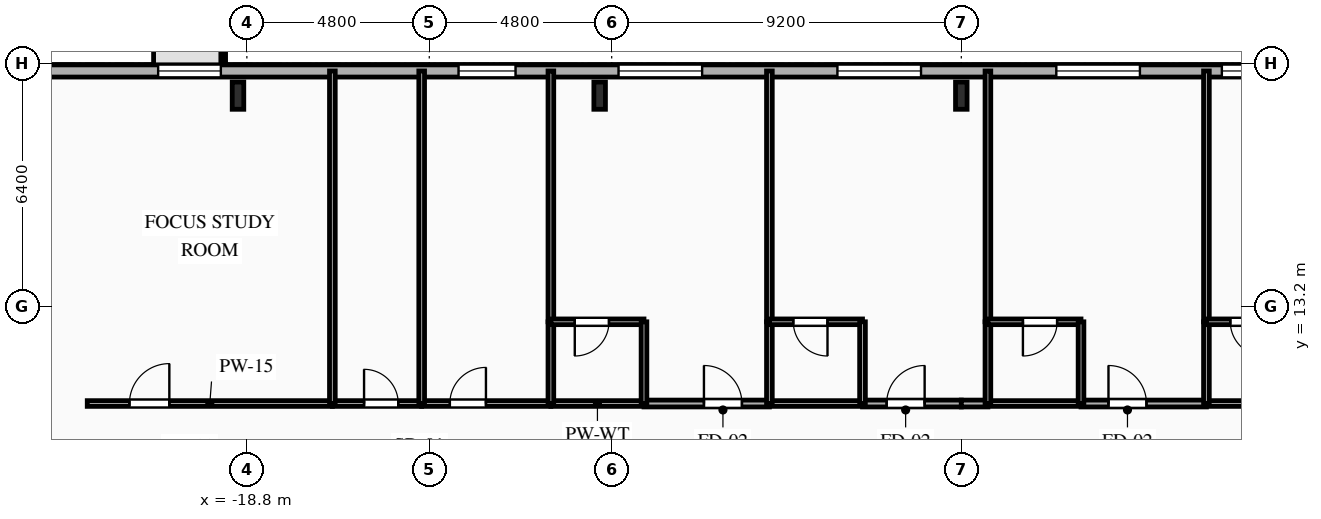
"""IFC4 building model, lengths in metres.
Left out: names, types, materials, properties, quantities, classifications, styles, units other than length and angle.
Written with IfcOpenShell. Run it as: python <this file> out.ifc"""

import sys

from ifc_helpers import new_model, si_unit, direction, frame, frame_2d, origin, origin_2d, place, context, subcontext, project, spatial, rectangle, i_section, extrude, element, fill, save


model = new_model("IFC4")
c1 = context("Model", 3, precision=1e-05, world=origin(), true_north=direction((0.0, 1.0)))
c2 = subcontext(c1, "Body", "Model", "MODEL_VIEW")
j1 = project(units=[si_unit("LENGTHUNIT", "METRE"), si_unit("PLANEANGLEUNIT", "RADIAN")], contexts=[c1])
p1 = place(None, origin())
s1 = spatial("IfcSite", under=j1, at=p1, CompositionType="ELEMENT")
p2 = place(p1, origin())
s2 = spatial("IfcBuilding", under=s1, at=p2, CompositionType="ELEMENT")
p3 = place(p2, frame((0.0, 0.0, 60.5)))
s3 = spatial("IfcBuildingStorey", under=s2, at=p3, CompositionType="ELEMENT", Elevation=60.5)
for number, where, z_axis, x_axis in (
    (1, (0.0, 18.75, 0.0), (0.0, 0.0, 1.0), (1.0, 0.0, 0.0)),
    (2, (-9.517, 18.75, 0.0), (0.0, 0.0, 1.0), (1.0, 0.0, 0.0)),
    (3, (-19.033, 18.75, 0.0), (0.0, 0.0, 1.0), (1.0, 0.0, 0.0)),
):
    element("IfcColumn", number, at=place(p3, frame(where, z_axis=z_axis, x_axis=x_axis)), inside=s3, PredefinedType="COLUMN", context=c2, shape_type="SweptSolid", body=[
        extrude(i_section(OverallWidth=0.304, OverallDepth=0.716, WebThickness=0.021, FlangeThickness=0.04, FilletRadius=0.027, at=origin_2d()), origin(), (0.0, 0.0, 1.0), 3.35),
    ])
p4 = place(p3, frame((-29.2, 19.4, 0.0), z_axis=(0.0, 0.0, 1.0), x_axis=(1.0, 0.0, 0.0)))
e4 = element("IfcWall", 4, at=p4, inside=s3, PredefinedType="SOLIDWALL", context=c2, shape_type="SweptSolid", body=[
    extrude(rectangle(XDim=58.4, YDim=0.32, at=frame_2d((29.2, 0.0))), origin(), (0.0, 0.0, 1.0), 3.035),
])
p5 = place(p4, frame((8.065, 0.0, 0.85)))
e5 = element("IfcOpeningElement", 5, at=p5, cuts=e4, PredefinedType="OPENING", context=c2, shape_type="SweptSolid", body=[
    extrude(rectangle(XDim=1.65, YDim=1.85, at=frame_2d((0.825, 0.925))), frame((0.0, 0.17, 0.0), z_axis=(0.0, -1.0, 0.0), x_axis=(1.0, 0.0, 0.0)), (0.0, 0.0, 1.0), 0.34),
])
p6 = place(p4, frame((15.97, 0.0, 0.85)))
e6 = element("IfcOpeningElement", 6, at=p6, cuts=e4, PredefinedType="OPENING", context=c2, shape_type="SweptSolid", body=[
    extrude(rectangle(XDim=1.5, YDim=1.85, at=frame_2d((0.75, 0.925))), frame((0.0, 0.17, 0.0), z_axis=(0.0, -1.0, 0.0), x_axis=(1.0, 0.0, 0.0)), (0.0, 0.0, 1.0), 0.34),
])
p7 = place(p4, frame((20.18, 0.0, 0.85)))
e7 = element("IfcOpeningElement", 7, at=p7, cuts=e4, PredefinedType="OPENING", context=c2, shape_type="SweptSolid", body=[
    extrude(rectangle(XDim=2.2, YDim=1.85, at=frame_2d((1.1, 0.925))), frame((0.0, 0.17, 0.0), z_axis=(0.0, -1.0, 0.0), x_axis=(1.0, 0.0, 0.0)), (0.0, 0.0, 1.0), 0.34),
])
p8 = place(p4, frame((25.94, 0.0, 0.85)))
e8 = element("IfcOpeningElement", 8, at=p8, cuts=e4, PredefinedType="OPENING", context=c2, shape_type="SweptSolid", body=[
    extrude(rectangle(XDim=2.2, YDim=1.85, at=frame_2d((1.1, 0.925))), frame((0.0, 0.17, 0.0), z_axis=(0.0, -1.0, 0.0), x_axis=(1.0, 0.0, 0.0)), (0.0, 0.0, 1.0), 0.34),
])
p9 = place(p4, frame((31.7, 0.0, 0.85)))
e9 = element("IfcOpeningElement", 9, at=p9, cuts=e4, PredefinedType="OPENING", context=c2, shape_type="SweptSolid", body=[
    extrude(rectangle(XDim=2.2, YDim=1.85, at=frame_2d((1.1, 0.925))), frame((0.0, 0.17, 0.0), z_axis=(0.0, -1.0, 0.0), x_axis=(1.0, 0.0, 0.0)), (0.0, 0.0, 1.0), 0.34),
])
p10 = place(p4, frame((36.056, 0.0, 0.85)))
e10 = element("IfcOpeningElement", 10, at=p10, cuts=e4, PredefinedType="OPENING", context=c2, shape_type="SweptSolid", body=[
    extrude(rectangle(XDim=2.2, YDim=1.85, at=frame_2d((1.1, 0.925))), frame((0.0, 0.17, 0.0), z_axis=(0.0, -1.0, 0.0), x_axis=(1.0, 0.0, 0.0)), (0.0, 0.0, 1.0), 0.34),
])
p11 = place(p4, frame((43.22, 0.0, 0.85)))
e11 = element("IfcOpeningElement", 11, at=p11, cuts=e4, PredefinedType="OPENING", context=c2, shape_type="SweptSolid", body=[
    extrude(rectangle(XDim=2.2, YDim=1.85, at=frame_2d((1.1, 0.925))), frame((0.0, 0.17, 0.0), z_axis=(0.0, -1.0, 0.0), x_axis=(1.0, 0.0, 0.0)), (0.0, 0.0, 1.0), 0.34),
])
p12 = place(p4, frame((48.895, 0.0, 0.85)))
e12 = element("IfcOpeningElement", 12, at=p12, cuts=e4, PredefinedType="OPENING", context=c2, shape_type="SweptSolid", body=[
    extrude(rectangle(XDim=1.65, YDim=1.85, at=frame_2d((0.825, 0.925))), frame((0.0, 0.17, 0.0), z_axis=(0.0, -1.0, 0.0), x_axis=(1.0, 0.0, 0.0)), (0.0, 0.0, 1.0), 0.34),
])
p13 = place(p3, frame((-23.0, 10.65, 0.0), z_axis=(0.0, 0.0, 1.0), x_axis=(1.0, 0.0, 0.0)))
e13 = element("IfcWall", 13, at=p13, inside=s3, PredefinedType="PARTITIONING", context=c2, shape_type="SweptSolid", body=[
    extrude(rectangle(XDim=6.45, YDim=0.15, at=frame_2d((3.225, 0.0))), origin(), (0.0, 0.0, 1.0), 3.035),
])
p14 = place(p13, frame((1.11, 0.0, 0.0)))
e14 = element("IfcOpeningElement", 14, at=p14, cuts=e13, PredefinedType="OPENING", context=c2, shape_type="SweptSolid", body=[
    extrude(rectangle(XDim=1.05, YDim=2.15, at=frame_2d((0.525, 1.075))), frame((0.0, 0.085, 0.0), z_axis=(0.0, -1.0, 0.0), x_axis=(1.0, 0.0, 0.0)), (0.0, 0.0, 1.0), 0.17),
])
p15 = place(p3, frame((-16.55, 10.65, 0.0), z_axis=(0.0, 0.0, 1.0), x_axis=(1.0, 0.0, 0.0)))
e15 = element("IfcWall", 15, at=p15, inside=s3, PredefinedType="PLUMBINGWALL", context=c2, shape_type="SweptSolid", body=[
    extrude(rectangle(XDim=2.35, YDim=0.15, at=frame_2d((1.175, 0.0))), origin(), (0.0, 0.0, 1.0), 3.035),
])
p16 = place(p15, frame((0.834, 0.0, 0.0)))
e16 = element("IfcOpeningElement", 16, at=p16, cuts=e15, PredefinedType="OPENING", context=c2, shape_type="SweptSolid", body=[
    extrude(rectangle(XDim=0.9, YDim=2.1, at=frame_2d((0.45, 1.05))), frame((0.0, 0.085, 0.0), z_axis=(0.0, -1.0, 0.0), x_axis=(1.0, 0.0, 0.0)), (0.0, 0.0, 1.0), 0.17),
])
p17 = place(p3, frame((-14.2, 10.65, 0.0), z_axis=(0.0, 0.0, 1.0), x_axis=(1.0, 0.0, 0.0)))
e17 = element("IfcWall", 17, at=p17, inside=s3, PredefinedType="PARTITIONING", context=c2, shape_type="SweptSolid", body=[
    extrude(rectangle(XDim=3.4, YDim=0.15, at=frame_2d((1.7, 0.0))), origin(), (0.0, 0.0, 1.0), 3.035),
])
p18 = place(p17, frame((0.741, 0.0, 0.0)))
e18 = element("IfcOpeningElement", 18, at=p18, cuts=e17, PredefinedType="OPENING", context=c2, shape_type="SweptSolid", body=[
    extrude(rectangle(XDim=0.95, YDim=2.1, at=frame_2d((0.475, 1.05))), frame((0.0, 0.085, 0.0), z_axis=(0.0, -1.0, 0.0), x_axis=(1.0, 0.0, 0.0)), (0.0, 0.0, 1.0), 0.17),
])
p19 = place(p3, frame((-8.35, 10.65, 0.0), z_axis=(0.0, 0.0, 1.0), x_axis=(1.0, 0.0, 0.0)))
e19 = element("IfcWall", 19, at=p19, inside=s3, PredefinedType="PARTITIONING", context=c2, shape_type="SweptSolid", body=[
    extrude(rectangle(XDim=3.3, YDim=0.18, at=frame_2d((1.65, 0.0))), origin(), (0.0, 0.0, 1.0), 3.035),
])
p20 = place(p19, frame((1.577, 0.0, 0.0)))
e20 = element("IfcOpeningElement", 20, at=p20, cuts=e19, PredefinedType="OPENING", context=c2, shape_type="SweptSolid", body=[
    extrude(rectangle(XDim=1.0, YDim=2.15, at=frame_2d((0.5, 1.075))), frame((0.0, 0.1, 0.0), z_axis=(0.0, -1.0, 0.0), x_axis=(1.0, 0.0, 0.0)), (0.0, 0.0, 1.0), 0.2),
])
p21 = place(p3, frame((-10.8, 10.65, 0.0), z_axis=(0.0, 0.0, 1.0), x_axis=(1.0, 0.0, 0.0)))
e21 = element("IfcWall", 21, at=p21, inside=s3, PredefinedType="PLUMBINGWALL", context=c2, shape_type="SweptSolid", body=[
    extrude(rectangle(XDim=2.45, YDim=0.15, at=frame_2d((1.225, 0.0))), origin(), (0.0, 0.0, 1.0), 3.035),
])
p22 = place(p3, frame((-2.6, 10.65, 0.0), z_axis=(0.0, 0.0, 1.0), x_axis=(1.0, 0.0, 0.0)))
e22 = element("IfcWall", 22, at=p22, inside=s3, PredefinedType="PARTITIONING", context=c2, shape_type="SweptSolid", body=[
    extrude(rectangle(XDim=2.6, YDim=0.18, at=frame_2d((1.3, 0.0))), origin(), (0.0, 0.0, 1.0), 3.035),
])
p23 = place(p22, frame((0.635, 0.0, 0.0)))
e23 = element("IfcOpeningElement", 23, at=p23, cuts=e22, PredefinedType="OPENING", context=c2, shape_type="SweptSolid", body=[
    extrude(rectangle(XDim=1.0, YDim=2.15, at=frame_2d((0.5, 1.075))), frame((0.0, 0.1, 0.0), z_axis=(0.0, -1.0, 0.0), x_axis=(1.0, 0.0, 0.0)), (0.0, 0.0, 1.0), 0.2),
])
p24 = place(p3, frame((-5.05, 10.65, 0.0), z_axis=(0.0, 0.0, 1.0), x_axis=(1.0, 0.0, 0.0)))
e24 = element("IfcWall", 24, at=p24, inside=s3, PredefinedType="PLUMBINGWALL", context=c2, shape_type="SweptSolid", body=[
    extrude(rectangle(XDim=2.45, YDim=0.15, at=frame_2d((1.225, 0.0))), origin(), (0.0, 0.0, 1.0), 3.035),
])
p25 = place(p3, frame((0.0, 10.65, 0.0), z_axis=(0.0, 0.0, 1.0), x_axis=(1.0, 0.0, 0.0)))
e25 = element("IfcWall", 25, at=p25, inside=s3, PredefinedType="PARTITIONING", context=c2, shape_type="SweptSolid", body=[
    extrude(rectangle(XDim=0.7, YDim=0.18, at=frame_2d((0.35, 0.0))), origin(), (0.0, 0.0, 1.0), 3.035),
])
p26 = place(p3, frame((3.15, 10.65, 0.0), z_axis=(0.0, 0.0, 1.0), x_axis=(1.0, 0.0, 0.0)))
e26 = element("IfcWall", 26, at=p26, inside=s3, PredefinedType="PARTITIONING", context=c2, shape_type="SweptSolid", body=[
    extrude(rectangle(XDim=3.3, YDim=0.18, at=frame_2d((1.65, 0.0))), origin(), (0.0, 0.0, 1.0), 3.035),
])
p27 = place(p26, frame((0.722, 0.0, 0.0)))
e27 = element("IfcOpeningElement", 27, at=p27, cuts=e26, PredefinedType="OPENING", context=c2, shape_type="SweptSolid", body=[
    extrude(rectangle(XDim=1.0, YDim=2.15, at=frame_2d((0.5, 1.075))), frame((0.0, 0.1, 0.0), z_axis=(0.0, -1.0, 0.0), x_axis=(1.0, 0.0, 0.0)), (0.0, 0.0, 1.0), 0.2),
])
for number, where, z_axis, x_axis in (
    (28, (0.7, 10.65, 0.0), (0.0, 0.0, 1.0), (1.0, 0.0, 0.0)),
    (29, (6.45, 10.65, 0.0), (0.0, 0.0, 1.0), (1.0, 0.0, 0.0)),
):
    element("IfcWall", number, at=place(p3, frame(where, z_axis=z_axis, x_axis=x_axis)), inside=s3, PredefinedType="PLUMBINGWALL", context=c2, shape_type="SweptSolid", body=[
        extrude(rectangle(XDim=2.45, YDim=0.15, at=frame_2d((1.225, 0.0))), origin(), (0.0, 0.0, 1.0), 3.035),
    ])
for number, where, z_axis, x_axis in (
    (30, (-16.55, 19.4, 0.0), (0.0, 0.0, 1.0), (0.0, -1.0, 0.0)),
    (31, (-14.2, 19.4, 0.0), (0.0, 0.0, 1.0), (0.0, -1.0, 0.0)),
):
    element("IfcWall", number, at=place(p3, frame(where, z_axis=z_axis, x_axis=x_axis)), inside=s3, PredefinedType="PLUMBINGWALL", context=c2, shape_type="SweptSolid", body=[
        extrude(rectangle(XDim=8.75, YDim=0.15, at=frame_2d((4.375, 0.0))), origin(), (0.0, 0.0, 1.0), 3.035),
    ])
p28 = place(p3, frame((-10.8, 19.4, 0.0), z_axis=(0.0, 0.0, 1.0), x_axis=(0.0, -1.0, 0.0)))
e32 = element("IfcWall", 32, at=p28, inside=s3, PredefinedType="PARTITIONING", context=c2, shape_type="SweptSolid", body=[
    extrude(rectangle(XDim=6.6, YDim=0.15, at=frame_2d((3.3, 0.0))), origin(), (0.0, 0.0, 1.0), 3.035),
])
p29 = place(p3, frame((-10.8, 12.8, 0.0), z_axis=(0.0, 0.0, 1.0), x_axis=(0.0, -1.0, 0.0)))
e33 = element("IfcWall", 33, at=p29, inside=s3, PredefinedType="PLUMBINGWALL", context=c2, shape_type="SweptSolid", body=[
    extrude(rectangle(XDim=2.15, YDim=0.15, at=frame_2d((1.075, 0.0))), origin(), (0.0, 0.0, 1.0), 3.035),
])
p30 = place(p3, frame((-8.35, 12.8, 0.0), z_axis=(0.0, 0.0, 1.0), x_axis=(-1.0, 0.0, 0.0)))
e34 = element("IfcWall", 34, at=p30, inside=s3, PredefinedType="PLUMBINGWALL", context=c2, shape_type="SweptSolid", body=[
    extrude(rectangle(XDim=2.45, YDim=0.15, at=frame_2d((1.225, 0.0))), origin(), (0.0, 0.0, 1.0), 3.035),
])
p31 = place(p30, frame((0.921, 0.0, 0.0)))
e35 = element("IfcOpeningElement", 35, at=p31, cuts=e34, PredefinedType="OPENING", context=c2, shape_type="SweptSolid", body=[
    extrude(rectangle(XDim=0.9, YDim=2.1, at=frame_2d((0.45, 1.05))), frame((0.0, 0.085, 0.0), z_axis=(0.0, -1.0, 0.0), x_axis=(1.0, 0.0, 0.0)), (0.0, 0.0, 1.0), 0.17),
])
p32 = place(p3, frame((-8.35, 10.65, 0.0), z_axis=(0.0, 0.0, 1.0), x_axis=(0.0, 1.0, 0.0)))
e36 = element("IfcWall", 36, at=p32, inside=s3, PredefinedType="PLUMBINGWALL", context=c2, shape_type="SweptSolid", body=[
    extrude(rectangle(XDim=2.15, YDim=0.15, at=frame_2d((1.075, 0.0))), origin(), (0.0, 0.0, 1.0), 3.035),
])
p33 = place(p3, frame((-5.05, 19.4, 0.0), z_axis=(0.0, 0.0, 1.0), x_axis=(0.0, -1.0, 0.0)))
e37 = element("IfcWall", 37, at=p33, inside=s3, PredefinedType="PARTITIONING", context=c2, shape_type="SweptSolid", body=[
    extrude(rectangle(XDim=6.6, YDim=0.15, at=frame_2d((3.3, 0.0))), origin(), (0.0, 0.0, 1.0), 3.035),
])
p34 = place(p3, frame((-5.05, 12.8, 0.0), z_axis=(0.0, 0.0, 1.0), x_axis=(0.0, -1.0, 0.0)))
e38 = element("IfcWall", 38, at=p34, inside=s3, PredefinedType="PLUMBINGWALL", context=c2, shape_type="SweptSolid", body=[
    extrude(rectangle(XDim=2.15, YDim=0.15, at=frame_2d((1.075, 0.0))), origin(), (0.0, 0.0, 1.0), 3.035),
])
p35 = place(p3, frame((-2.6, 12.8, 0.0), z_axis=(0.0, 0.0, 1.0), x_axis=(-1.0, 0.0, 0.0)))
e39 = element("IfcWall", 39, at=p35, inside=s3, PredefinedType="PLUMBINGWALL", context=c2, shape_type="SweptSolid", body=[
    extrude(rectangle(XDim=2.45, YDim=0.15, at=frame_2d((1.225, 0.0))), origin(), (0.0, 0.0, 1.0), 3.035),
])
p36 = place(p35, frame((0.921, 0.0, 0.0)))
e40 = element("IfcOpeningElement", 40, at=p36, cuts=e39, PredefinedType="OPENING", context=c2, shape_type="SweptSolid", body=[
    extrude(rectangle(XDim=0.9, YDim=2.1, at=frame_2d((0.45, 1.05))), frame((0.0, 0.085, 0.0), z_axis=(0.0, -1.0, 0.0), x_axis=(1.0, 0.0, 0.0)), (0.0, 0.0, 1.0), 0.17),
])
p37 = place(p3, frame((-2.6, 10.65, 0.0), z_axis=(0.0, 0.0, 1.0), x_axis=(0.0, 1.0, 0.0)))
e41 = element("IfcWall", 41, at=p37, inside=s3, PredefinedType="PLUMBINGWALL", context=c2, shape_type="SweptSolid", body=[
    extrude(rectangle(XDim=2.15, YDim=0.15, at=frame_2d((1.075, 0.0))), origin(), (0.0, 0.0, 1.0), 3.035),
])
p38 = place(p3, frame((0.7, 19.4, 0.0), z_axis=(0.0, 0.0, 1.0), x_axis=(0.0, -1.0, 0.0)))
e42 = element("IfcWall", 42, at=p38, inside=s3, PredefinedType="PARTITIONING", context=c2, shape_type="SweptSolid", body=[
    extrude(rectangle(XDim=6.6, YDim=0.15, at=frame_2d((3.3, 0.0))), origin(), (0.0, 0.0, 1.0), 3.035),
])
p39 = place(p3, frame((0.7, 12.8, 0.0), z_axis=(0.0, 0.0, 1.0), x_axis=(0.0, -1.0, 0.0)))
e43 = element("IfcWall", 43, at=p39, inside=s3, PredefinedType="PLUMBINGWALL", context=c2, shape_type="SweptSolid", body=[
    extrude(rectangle(XDim=2.15, YDim=0.15, at=frame_2d((1.075, 0.0))), origin(), (0.0, 0.0, 1.0), 3.035),
])
p40 = place(p3, frame((3.15, 12.8, 0.0), z_axis=(0.0, 0.0, 1.0), x_axis=(-1.0, 0.0, 0.0)))
e44 = element("IfcWall", 44, at=p40, inside=s3, PredefinedType="PLUMBINGWALL", context=c2, shape_type="SweptSolid", body=[
    extrude(rectangle(XDim=2.45, YDim=0.15, at=frame_2d((1.225, 0.0))), origin(), (0.0, 0.0, 1.0), 3.035),
])
p41 = place(p40, frame((0.629, 0.0, 0.0)))
e45 = element("IfcOpeningElement", 45, at=p41, cuts=e44, PredefinedType="OPENING", context=c2, shape_type="SweptSolid", body=[
    extrude(rectangle(XDim=0.9, YDim=2.1, at=frame_2d((0.45, 1.05))), frame((0.0, 0.085, 0.0), z_axis=(0.0, -1.0, 0.0), x_axis=(1.0, 0.0, 0.0)), (0.0, 0.0, 1.0), 0.17),
])
p42 = place(p3, frame((3.15, 10.65, 0.0), z_axis=(0.0, 0.0, 1.0), x_axis=(0.0, 1.0, 0.0)))
e46 = element("IfcWall", 46, at=p42, inside=s3, PredefinedType="PLUMBINGWALL", context=c2, shape_type="SweptSolid", body=[
    extrude(rectangle(XDim=2.15, YDim=0.15, at=frame_2d((1.075, 0.0))), origin(), (0.0, 0.0, 1.0), 3.035),
])
p43 = place(p3, frame((6.45, 19.4, 0.0), z_axis=(0.0, 0.0, 1.0), x_axis=(0.0, -1.0, 0.0)))
e47 = element("IfcWall", 47, at=p43, inside=s3, PredefinedType="PARTITIONING", context=c2, shape_type="SweptSolid", body=[
    extrude(rectangle(XDim=6.6, YDim=0.15, at=frame_2d((3.3, 0.0))), origin(), (0.0, 0.0, 1.0), 3.035),
])
p44 = place(p3, frame((6.45, 12.8, 0.0), z_axis=(0.0, 0.0, 1.0), x_axis=(0.0, -1.0, 0.0)))
e48 = element("IfcWall", 48, at=p44, inside=s3, PredefinedType="PLUMBINGWALL", context=c2, shape_type="SweptSolid", body=[
    extrude(rectangle(XDim=2.15, YDim=0.15, at=frame_2d((1.075, 0.0))), origin(), (0.0, 0.0, 1.0), 3.035),
])
p45 = place(p3, frame((8.9, 12.8, 0.0), z_axis=(0.0, 0.0, 1.0), x_axis=(-1.0, 0.0, 0.0)))
e49 = element("IfcWall", 49, at=p45, inside=s3, PredefinedType="PLUMBINGWALL", context=c2, shape_type="SweptSolid", body=[
    extrude(rectangle(XDim=2.45, YDim=0.15, at=frame_2d((1.225, 0.0))), origin(), (0.0, 0.0, 1.0), 3.035),
])
p46 = place(p45, frame((0.921, 0.0, 0.0)))
e50 = element("IfcOpeningElement", 50, at=p46, cuts=e49, PredefinedType="OPENING", context=c2, shape_type="SweptSolid", body=[
    extrude(rectangle(XDim=0.9, YDim=2.1, at=frame_2d((0.45, 1.05))), frame((0.0, 0.085, 0.0), z_axis=(0.0, -1.0, 0.0), x_axis=(1.0, 0.0, 0.0)), (0.0, 0.0, 1.0), 0.17),
])
p47 = place(p5, origin())
e51 = element("IfcWindow", 51, at=p47, inside=s3, PartitioningType="SINGLE_PANEL", PredefinedType="WINDOW", context=c2, shape_type="SweptSolid", body=[
    extrude(rectangle(XDim=1.65, YDim=1.85, at=frame_2d((0.825, 0.925))), frame((0.0, 0.03, 0.0), z_axis=(0.0, -1.0, 0.0), x_axis=(1.0, 0.0, 0.0)), (0.0, 0.0, 1.0), 0.06),
])
fill(e5, e51)
p48 = place(p6, origin())
e52 = element("IfcWindow", 52, at=p48, inside=s3, PartitioningType="SINGLE_PANEL", PredefinedType="WINDOW", context=c2, shape_type="SweptSolid", body=[
    extrude(rectangle(XDim=1.5, YDim=1.85, at=frame_2d((0.75, 0.925))), frame((0.0, 0.03, 0.0), z_axis=(0.0, -1.0, 0.0), x_axis=(1.0, 0.0, 0.0)), (0.0, 0.0, 1.0), 0.06),
])
fill(e6, e52)
p49 = place(p7, origin())
e53 = element("IfcWindow", 53, at=p49, inside=s3, PartitioningType="SINGLE_PANEL", PredefinedType="WINDOW", context=c2, shape_type="SweptSolid", body=[
    extrude(rectangle(XDim=2.2, YDim=1.85, at=frame_2d((1.1, 0.925))), frame((0.0, 0.03, 0.0), z_axis=(0.0, -1.0, 0.0), x_axis=(1.0, 0.0, 0.0)), (0.0, 0.0, 1.0), 0.06),
])
fill(e7, e53)
p50 = place(p8, origin())
e54 = element("IfcWindow", 54, at=p50, inside=s3, PartitioningType="SINGLE_PANEL", PredefinedType="WINDOW", context=c2, shape_type="SweptSolid", body=[
    extrude(rectangle(XDim=2.2, YDim=1.85, at=frame_2d((1.1, 0.925))), frame((0.0, 0.03, 0.0), z_axis=(0.0, -1.0, 0.0), x_axis=(1.0, 0.0, 0.0)), (0.0, 0.0, 1.0), 0.06),
])
fill(e8, e54)
p51 = place(p9, origin())
e55 = element("IfcWindow", 55, at=p51, inside=s3, PartitioningType="SINGLE_PANEL", PredefinedType="WINDOW", context=c2, shape_type="SweptSolid", body=[
    extrude(rectangle(XDim=2.2, YDim=1.85, at=frame_2d((1.1, 0.925))), frame((0.0, 0.03, 0.0), z_axis=(0.0, -1.0, 0.0), x_axis=(1.0, 0.0, 0.0)), (0.0, 0.0, 1.0), 0.06),
])
fill(e9, e55)
p52 = place(p10, origin())
e56 = element("IfcWindow", 56, at=p52, inside=s3, PartitioningType="SINGLE_PANEL", PredefinedType="WINDOW", context=c2, shape_type="SweptSolid", body=[
    extrude(rectangle(XDim=2.2, YDim=1.85, at=frame_2d((1.1, 0.925))), frame((0.0, 0.03, 0.0), z_axis=(0.0, -1.0, 0.0), x_axis=(1.0, 0.0, 0.0)), (0.0, 0.0, 1.0), 0.06),
])
fill(e10, e56)
p53 = place(p14, origin())
e57 = element("IfcDoor", 57, at=p53, inside=s3, OperationType="SINGLE_SWING_RIGHT", PredefinedType="DOOR", context=c2, shape_type="SweptSolid", body=[
    extrude(rectangle(XDim=1.05, YDim=2.15, at=frame_2d((0.525, 1.075))), frame((0.0, 0.025, 0.0), z_axis=(0.0, -1.0, 0.0), x_axis=(1.0, 0.0, 0.0)), (0.0, 0.0, 1.0), 0.05),
])
fill(e14, e57)
p54 = place(p16, origin())
e58 = element("IfcDoor", 58, at=p54, inside=s3, OperationType="SINGLE_SWING_LEFT", PredefinedType="DOOR", context=c2, shape_type="SweptSolid", body=[
    extrude(rectangle(XDim=0.9, YDim=2.1, at=frame_2d((0.45, 1.05))), frame((0.0, 0.025, 0.0), z_axis=(0.0, -1.0, 0.0), x_axis=(1.0, 0.0, 0.0)), (0.0, 0.0, 1.0), 0.05),
])
fill(e16, e58)
p55 = place(p18, origin())
e59 = element("IfcDoor", 59, at=p55, inside=s3, OperationType="SINGLE_SWING_RIGHT", PredefinedType="DOOR", context=c2, shape_type="SweptSolid", body=[
    extrude(rectangle(XDim=0.95, YDim=2.1, at=frame_2d((0.475, 1.05))), frame((0.0, 0.025, 0.0), z_axis=(0.0, -1.0, 0.0), x_axis=(1.0, 0.0, 0.0)), (0.0, 0.0, 1.0), 0.05),
])
fill(e18, e59)
p56 = place(p20, origin())
e60 = element("IfcDoor", 60, at=p56, inside=s3, OperationType="SINGLE_SWING_LEFT", PredefinedType="DOOR", context=c2, shape_type="SweptSolid", body=[
    extrude(rectangle(XDim=1.0, YDim=2.15, at=frame_2d((0.5, 1.075))), frame((0.0, 0.025, 0.0), z_axis=(0.0, -1.0, 0.0), x_axis=(1.0, 0.0, 0.0)), (0.0, 0.0, 1.0), 0.05),
])
fill(e20, e60)
p57 = place(p23, origin())
e61 = element("IfcDoor", 61, at=p57, inside=s3, OperationType="SINGLE_SWING_RIGHT", PredefinedType="DOOR", context=c2, shape_type="SweptSolid", body=[
    extrude(rectangle(XDim=1.0, YDim=2.15, at=frame_2d((0.5, 1.075))), frame((0.0, 0.025, 0.0), z_axis=(0.0, -1.0, 0.0), x_axis=(1.0, 0.0, 0.0)), (0.0, 0.0, 1.0), 0.05),
])
fill(e23, e61)
p58 = place(p27, origin())
e62 = element("IfcDoor", 62, at=p58, inside=s3, OperationType="SINGLE_SWING_LEFT", PredefinedType="DOOR", context=c2, shape_type="SweptSolid", body=[
    extrude(rectangle(XDim=1.0, YDim=2.15, at=frame_2d((0.5, 1.075))), frame((0.0, 0.025, 0.0), z_axis=(0.0, -1.0, 0.0), x_axis=(1.0, 0.0, 0.0)), (0.0, 0.0, 1.0), 0.05),
])
fill(e27, e62)
p59 = place(p31, origin())
e63 = element("IfcDoor", 63, at=p59, inside=s3, OperationType="SINGLE_SWING_RIGHT", PredefinedType="DOOR", context=c2, shape_type="SweptSolid", body=[
    extrude(rectangle(XDim=0.9, YDim=2.1, at=frame_2d((0.45, 1.05))), frame((0.0, 0.025, 0.0), z_axis=(0.0, -1.0, 0.0), x_axis=(1.0, 0.0, 0.0)), (0.0, 0.0, 1.0), 0.05),
])
fill(e35, e63)
p60 = place(p36, origin())
e64 = element("IfcDoor", 64, at=p60, inside=s3, OperationType="SINGLE_SWING_LEFT", PredefinedType="DOOR", context=c2, shape_type="SweptSolid", body=[
    extrude(rectangle(XDim=0.9, YDim=2.1, at=frame_2d((0.45, 1.05))), frame((0.0, 0.025, 0.0), z_axis=(0.0, -1.0, 0.0), x_axis=(1.0, 0.0, 0.0)), (0.0, 0.0, 1.0), 0.05),
])
fill(e40, e64)
p61 = place(p41, origin())
e65 = element("IfcDoor", 65, at=p61, inside=s3, OperationType="SINGLE_SWING_RIGHT", PredefinedType="DOOR", context=c2, shape_type="SweptSolid", body=[
    extrude(rectangle(XDim=0.9, YDim=2.1, at=frame_2d((0.45, 1.05))), frame((0.0, 0.025, 0.0), z_axis=(0.0, -1.0, 0.0), x_axis=(1.0, 0.0, 0.0)), (0.0, 0.0, 1.0), 0.05),
])
fill(e45, e65)
p62 = place(p46, origin())
e66 = element("IfcDoor", 66, at=p62, inside=s3, OperationType="SINGLE_SWING_LEFT", PredefinedType="DOOR", context=c2, shape_type="SweptSolid", body=[
    extrude(rectangle(XDim=0.9, YDim=2.1, at=frame_2d((0.45, 1.05))), frame((0.0, 0.025, 0.0), z_axis=(0.0, -1.0, 0.0), x_axis=(1.0, 0.0, 0.0)), (0.0, 0.0, 1.0), 0.05),
])
fill(e50, e66)
save(model, sys.argv[1])
